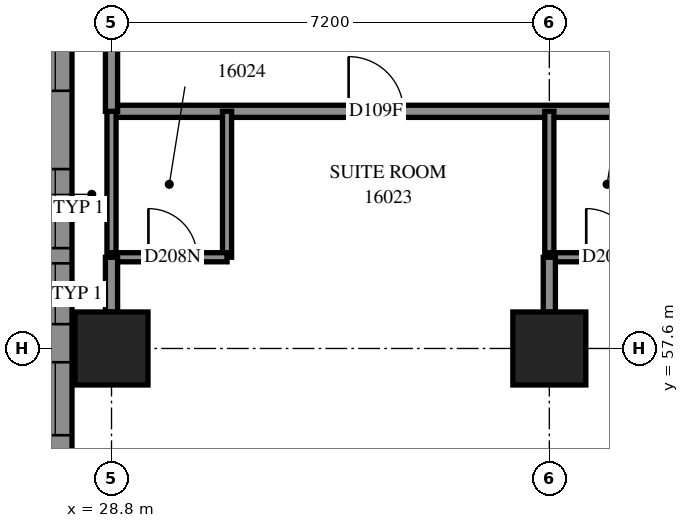
"""IFC4 building model, lengths in metres.
Left out: names, types, materials, properties, quantities, classifications, styles, units other than length and angle.
Written with IfcOpenShell. Run it as: python <this file> out.ifc"""

import sys

from ifc_helpers import new_model, si_unit, direction, frame, frame_2d, origin, origin_2d, place, context, subcontext, project, spatial, polyline, rectangle, outline, extrude, element, fill, save


model = new_model("IFC4")
c1 = context("Model", 3, precision=1e-05, world=origin(), true_north=direction((0.0, 1.0)))
c2 = subcontext(c1, "Body", "Model", "MODEL_VIEW")
j1 = project(units=[si_unit("LENGTHUNIT", "METRE"), si_unit("PLANEANGLEUNIT", "RADIAN")], contexts=[c1])
p1 = place(None, origin())
s1 = spatial("IfcSite", under=j1, at=p1, CompositionType="ELEMENT")
p2 = place(p1, origin())
s2 = spatial("IfcBuilding", under=s1, at=p2, CompositionType="ELEMENT")
p3 = place(p2, frame((0.0, 0.0, 61.0)))
s3 = spatial("IfcBuildingStorey", under=s2, at=p3, CompositionType="ELEMENT", Elevation=61.0)
for number, where, z_axis, x_axis in (
    (1, (28.8, 57.6, 0.0), (0.0, 0.0, 1.0), (1.0, 0.0, 0.0)),
    (2, (36.0, 57.6, 0.0), (0.0, 0.0, 1.0), (1.0, 0.0, 0.0)),
):
    element("IfcColumn", number, at=place(p3, frame(where, z_axis=z_axis, x_axis=x_axis)), inside=s3, PredefinedType="COLUMN", context=c2, shape_type="SweptSolid", body=[
        extrude(rectangle(XDim=1.2, YDim=1.2, at=origin_2d()), origin(), (0.0, 0.0, 1.0), 3.1),
    ])
p4 = place(p3, frame((27.875, 63.875, 0.0), z_axis=(0.0, 0.0, 1.0), x_axis=(0.0, -1.0, 0.0)))
e3 = element("IfcWall", 3, at=p4, inside=s3, PredefinedType="SOLIDWALL", context=c2, shape_type="SweptSolid", body=[
    extrude(outline(polyline([(0.275, -0.275), (8.678, -0.275), (8.128, 0.275), (-0.275, 0.275), (0.275, -0.275)])), origin(), (0.0, 0.0, 1.0), 3.1),
])
p5 = place(p4, frame((0.838, 0.0, 0.5)))
e4 = element("IfcOpeningElement", 4, at=p5, cuts=e3, PredefinedType="OPENING", context=c2, shape_type="SweptSolid", body=[
    extrude(rectangle(XDim=1.2, YDim=2.45, at=frame_2d((0.6, 1.225))), frame((0.0, 0.285, 0.0), z_axis=(0.0, -1.0, 0.0), x_axis=(1.0, 0.0, 0.0)), (0.0, 0.0, 1.0), 0.57),
])
p6 = place(p4, frame((6.502, 0.0, 0.5)))
e5 = element("IfcOpeningElement", 5, at=p6, cuts=e3, PredefinedType="OPENING", context=c2, shape_type="SweptSolid", body=[
    extrude(rectangle(XDim=1.2, YDim=2.45, at=frame_2d((0.6, 1.225))), frame((0.0, 0.285, 0.0), z_axis=(0.0, -1.0, 0.0), x_axis=(1.0, 0.0, 0.0)), (0.0, 0.0, 1.0), 0.57),
])
p7 = place(p4, frame((3.325, 0.0, 0.45)))
e6 = element("IfcOpeningElement", 6, at=p7, cuts=e3, PredefinedType="OPENING", context=c2, shape_type="SweptSolid", body=[
    extrude(rectangle(XDim=1.3, YDim=2.5, at=frame_2d((0.65, 1.25))), frame((0.0, 0.285, 0.0), z_axis=(0.0, -1.0, 0.0), x_axis=(1.0, 0.0, 0.0)), (0.0, 0.0, 1.0), 0.57),
])
p8 = place(p4, frame((4.875, 0.0, 0.45)))
e7 = element("IfcOpeningElement", 7, at=p8, cuts=e3, PredefinedType="OPENING", context=c2, shape_type="SweptSolid", body=[
    extrude(rectangle(XDim=1.0, YDim=2.5, at=frame_2d((0.5, 1.25))), frame((0.0, 0.285, 0.0), z_axis=(0.0, -1.0, 0.0), x_axis=(1.0, 0.0, 0.0)), (0.0, 0.0, 1.0), 0.57),
])
p9 = place(p3, frame((28.8, 61.5, 0.0), z_axis=(0.0, 0.0, 1.0), x_axis=(1.0, 0.0, 0.0)))
e8 = element("IfcWall", 8, at=p9, inside=s3, PredefinedType="PARTITIONING", context=c2, shape_type="SweptSolid", body=[
    extrude(rectangle(XDim=24.3, YDim=0.2, at=frame_2d((12.15, 0.0))), origin(), (0.0, 0.0, 1.0), 3.1),
])
p10 = place(p9, frame((3.899, 0.0, 0.0)))
e9 = element("IfcOpeningElement", 9, at=p10, cuts=e8, PredefinedType="OPENING", context=c2, shape_type="SweptSolid", body=[
    extrude(rectangle(XDim=0.9, YDim=2.1, at=frame_2d((0.45, 1.05))), frame((0.0, 0.11, 0.0), z_axis=(0.0, -1.0, 0.0), x_axis=(1.0, 0.0, 0.0)), (0.0, 0.0, 1.0), 0.22),
])
p11 = place(p9, frame((9.5, 0.0, 0.0)))
e10 = element("IfcOpeningElement", 10, at=p11, cuts=e8, PredefinedType="OPENING", context=c2, shape_type="SweptSolid", body=[
    extrude(rectangle(XDim=0.9, YDim=2.1, at=frame_2d((0.45, 1.05))), frame((0.0, 0.11, 0.0), z_axis=(0.0, -1.0, 0.0), x_axis=(1.0, 0.0, 0.0)), (0.0, 0.0, 1.0), 0.22),
])
p12 = place(p9, frame((11.307, 0.0, 0.0)))
e11 = element("IfcOpeningElement", 11, at=p12, cuts=e8, PredefinedType="OPENING", context=c2, shape_type="SweptSolid", body=[
    extrude(rectangle(XDim=1.0, YDim=2.1, at=frame_2d((0.5, 1.05))), frame((0.0, 0.11, 0.0), z_axis=(0.0, -1.0, 0.0), x_axis=(1.0, 0.0, 0.0)), (0.0, 0.0, 1.0), 0.22),
])
p13 = place(p9, frame((16.7, 0.0, 0.0)))
e12 = element("IfcOpeningElement", 12, at=p13, cuts=e8, PredefinedType="OPENING", context=c2, shape_type="SweptSolid", body=[
    extrude(rectangle(XDim=0.9, YDim=2.1, at=frame_2d((0.45, 1.05))), frame((0.0, 0.11, 0.0), z_axis=(0.0, -1.0, 0.0), x_axis=(1.0, 0.0, 0.0)), (0.0, 0.0, 1.0), 0.22),
])
p14 = place(p9, frame((18.508, 0.0, 0.0)))
e13 = element("IfcOpeningElement", 13, at=p14, cuts=e8, PredefinedType="OPENING", context=c2, shape_type="SweptSolid", body=[
    extrude(rectangle(XDim=1.0, YDim=2.1, at=frame_2d((0.5, 1.05))), frame((0.0, 0.11, 0.0), z_axis=(0.0, -1.0, 0.0), x_axis=(1.0, 0.0, 0.0)), (0.0, 0.0, 1.0), 0.22),
])
p15 = place(p9, frame((23.033, 0.0, 0.0)))
e14 = element("IfcOpeningElement", 14, at=p15, cuts=e8, PredefinedType="OPENING", context=c2, shape_type="SweptSolid", body=[
    extrude(rectangle(XDim=1.0, YDim=2.1, at=frame_2d((0.5, 1.05))), frame((0.0, 0.11, 0.0), z_axis=(0.0, -1.0, 0.0), x_axis=(1.0, 0.0, 0.0)), (0.0, 0.0, 1.0), 0.22),
])
p16 = place(p3, frame((30.7, 59.1, 0.0), z_axis=(0.0, 0.0, 1.0), x_axis=(0.0, 1.0, 0.0)))
e15 = element("IfcWall", 15, at=p16, inside=s3, PredefinedType="PARTITIONING", context=c2, shape_type="SweptSolid", body=[
    extrude(rectangle(XDim=2.4, YDim=0.15, at=frame_2d((1.2, 0.0))), origin(), (0.0, 0.0, 1.0), 3.1),
])
p17 = place(p3, frame((28.8, 59.1, 0.0), z_axis=(0.0, 0.0, 1.0), x_axis=(0.0, 1.0, 0.0)))
e16 = element("IfcWall", 16, at=p17, inside=s3, PredefinedType="PARTITIONING", context=c2, shape_type="SweptSolid", body=[
    extrude(rectangle(XDim=2.4, YDim=0.15, at=frame_2d((1.2, 0.0))), origin(), (0.0, 0.0, 1.0), 2.6),
])
p18 = place(p3, frame((36.0, 59.1, 0.0), z_axis=(0.0, 0.0, 1.0), x_axis=(0.0, 1.0, 0.0)))
e17 = element("IfcWall", 17, at=p18, inside=s3, PredefinedType="PARTITIONING", context=c2, shape_type="SweptSolid", body=[
    extrude(rectangle(XDim=2.4, YDim=0.15, at=frame_2d((1.2, 0.0))), origin(), (0.0, 0.0, 1.0), 3.1),
])
p19 = place(p3, frame((28.8, 59.1, 0.0), z_axis=(0.0, 0.0, 1.0), x_axis=(1.0, 0.0, 0.0)))
e18 = element("IfcWall", 18, at=p19, inside=s3, PredefinedType="PARTITIONING", context=c2, shape_type="SweptSolid", body=[
    extrude(rectangle(XDim=1.9, YDim=0.15, at=frame_2d((0.95, 0.0))), origin(), (0.0, 0.0, 1.0), 3.1),
])
p20 = place(p19, frame((0.607, 0.0, 0.0)))
e19 = element("IfcOpeningElement", 19, at=p20, cuts=e18, PredefinedType="OPENING", context=c2, shape_type="SweptSolid", body=[
    extrude(rectangle(XDim=0.8, YDim=2.1, at=frame_2d((0.4, 1.05))), frame((0.0, 0.085, 0.0), z_axis=(0.0, -1.0, 0.0), x_axis=(1.0, 0.0, 0.0)), (0.0, 0.0, 1.0), 0.17),
])
p21 = place(p3, frame((36.0, 59.1, 0.0), z_axis=(0.0, 0.0, 1.0), x_axis=(1.0, 0.0, 0.0)))
e20 = element("IfcWall", 20, at=p21, inside=s3, PredefinedType="PARTITIONING", context=c2, shape_type="SweptSolid", body=[
    extrude(rectangle(XDim=1.9, YDim=0.15, at=frame_2d((0.95, 0.0))), origin(), (0.0, 0.0, 1.0), 3.1),
])
p22 = place(p21, frame((0.607, 0.0, 0.0)))
e21 = element("IfcOpeningElement", 21, at=p22, cuts=e20, PredefinedType="OPENING", context=c2, shape_type="SweptSolid", body=[
    extrude(rectangle(XDim=0.8, YDim=2.1, at=frame_2d((0.4, 1.05))), frame((0.0, 0.085, 0.0), z_axis=(0.0, -1.0, 0.0), x_axis=(1.0, 0.0, 0.0)), (0.0, 0.0, 1.0), 0.17),
])
p23 = place(p3, frame((28.8, 61.5, 0.0), z_axis=(0.0, 0.0, 1.0), x_axis=(0.0, 1.0, 0.0)))
e22 = element("IfcWall", 22, at=p23, inside=s3, PredefinedType="PARTITIONING", context=c2, shape_type="SweptSolid", body=[
    extrude(rectangle(XDim=1.8, YDim=0.2, at=frame_2d((0.9, 0.0))), origin(), (0.0, 0.0, 1.0), 2.6),
])
p24 = place(p3, frame((28.8, 58.2, 0.0), z_axis=(0.0, 0.0, 1.0), x_axis=(0.0, 1.0, 0.0)))
e23 = element("IfcWall", 23, at=p24, inside=s3, PredefinedType="PARTITIONING", context=c2, shape_type="SweptSolid", body=[
    extrude(rectangle(XDim=0.9, YDim=0.2, at=frame_2d((0.45, 0.0))), origin(), (0.0, 0.0, 1.0), 2.6),
])
p25 = place(p3, frame((36.0, 58.2, 0.0), z_axis=(0.0, 0.0, 1.0), x_axis=(0.0, 1.0, 0.0)))
e24 = element("IfcWall", 24, at=p25, inside=s3, PredefinedType="PARTITIONING", context=c2, shape_type="SweptSolid", body=[
    extrude(rectangle(XDim=0.9, YDim=0.2, at=frame_2d((0.45, 0.0))), origin(), (0.0, 0.0, 1.0), 3.1),
])
p26 = place(p5, origin())
e25 = element("IfcWindow", 25, at=p26, inside=s3, PartitioningType="SINGLE_PANEL", PredefinedType="WINDOW", context=c2, shape_type="SweptSolid", body=[
    extrude(rectangle(XDim=1.2, YDim=2.45, at=frame_2d((0.6, 1.225))), frame((0.0, 0.155, 0.0), z_axis=(0.0, -1.0, 0.0), x_axis=(1.0, 0.0, 0.0)), (0.0, 0.0, 1.0), 0.06),
])
fill(e4, e25)
p27 = place(p6, origin())
e26 = element("IfcWindow", 26, at=p27, inside=s3, PartitioningType="SINGLE_PANEL", PredefinedType="WINDOW", context=c2, shape_type="SweptSolid", body=[
    extrude(rectangle(XDim=1.2, YDim=2.45, at=frame_2d((0.6, 1.225))), frame((0.0, 0.155, 0.0), z_axis=(0.0, -1.0, 0.0), x_axis=(1.0, 0.0, 0.0)), (0.0, 0.0, 1.0), 0.06),
])
fill(e5, e26)
p28 = place(p10, origin())
e27 = element("IfcDoor", 27, at=p28, inside=s3, OperationType="SINGLE_SWING_LEFT", PredefinedType="DOOR", context=c2, shape_type="SweptSolid", body=[
    extrude(rectangle(XDim=0.9, YDim=2.1, at=frame_2d((0.45, 1.05))), frame((0.0, 0.025, 0.0), z_axis=(0.0, -1.0, 0.0), x_axis=(1.0, 0.0, 0.0)), (0.0, 0.0, 1.0), 0.05),
])
fill(e9, e27)
p29 = place(p20, origin())
e28 = element("IfcDoor", 28, at=p29, inside=s3, OperationType="SINGLE_SWING_RIGHT", PredefinedType="DOOR", context=c2, shape_type="SweptSolid", body=[
    extrude(rectangle(XDim=0.8, YDim=2.1, at=frame_2d((0.4, 1.05))), frame((0.0, 0.025, 0.0), z_axis=(0.0, -1.0, 0.0), x_axis=(1.0, 0.0, 0.0)), (0.0, 0.0, 1.0), 0.05),
])
fill(e19, e28)
p30 = place(p22, origin())
e29 = element("IfcDoor", 29, at=p30, inside=s3, OperationType="SINGLE_SWING_RIGHT", PredefinedType="DOOR", context=c2, shape_type="SweptSolid", body=[
    extrude(rectangle(XDim=0.8, YDim=2.1, at=frame_2d((0.4, 1.05))), frame((0.0, 0.025, 0.0), z_axis=(0.0, -1.0, 0.0), x_axis=(1.0, 0.0, 0.0)), (0.0, 0.0, 1.0), 0.05),
])
fill(e21, e29)
p31 = place(p7, origin())
e30 = element("IfcWindow", 30, at=p31, inside=s3, PartitioningType="SINGLE_PANEL", PredefinedType="WINDOW", context=c2, shape_type="SweptSolid", body=[
    extrude(rectangle(XDim=1.3, YDim=2.5, at=frame_2d((0.65, 1.25))), frame((0.0, 0.155, 0.0), z_axis=(0.0, -1.0, 0.0), x_axis=(1.0, 0.0, 0.0)), (0.0, 0.0, 1.0), 0.06),
])
fill(e6, e30)
p32 = place(p8, origin())
e31 = element("IfcWindow", 31, at=p32, inside=s3, PartitioningType="SINGLE_PANEL", PredefinedType="WINDOW", context=c2, shape_type="SweptSolid", body=[
    extrude(rectangle(XDim=1.0, YDim=2.5, at=frame_2d((0.5, 1.25))), frame((0.0, 0.155, 0.0), z_axis=(0.0, -1.0, 0.0), x_axis=(1.0, 0.0, 0.0)), (0.0, 0.0, 1.0), 0.06),
])
fill(e7, e31)
save(model, sys.argv[1])
